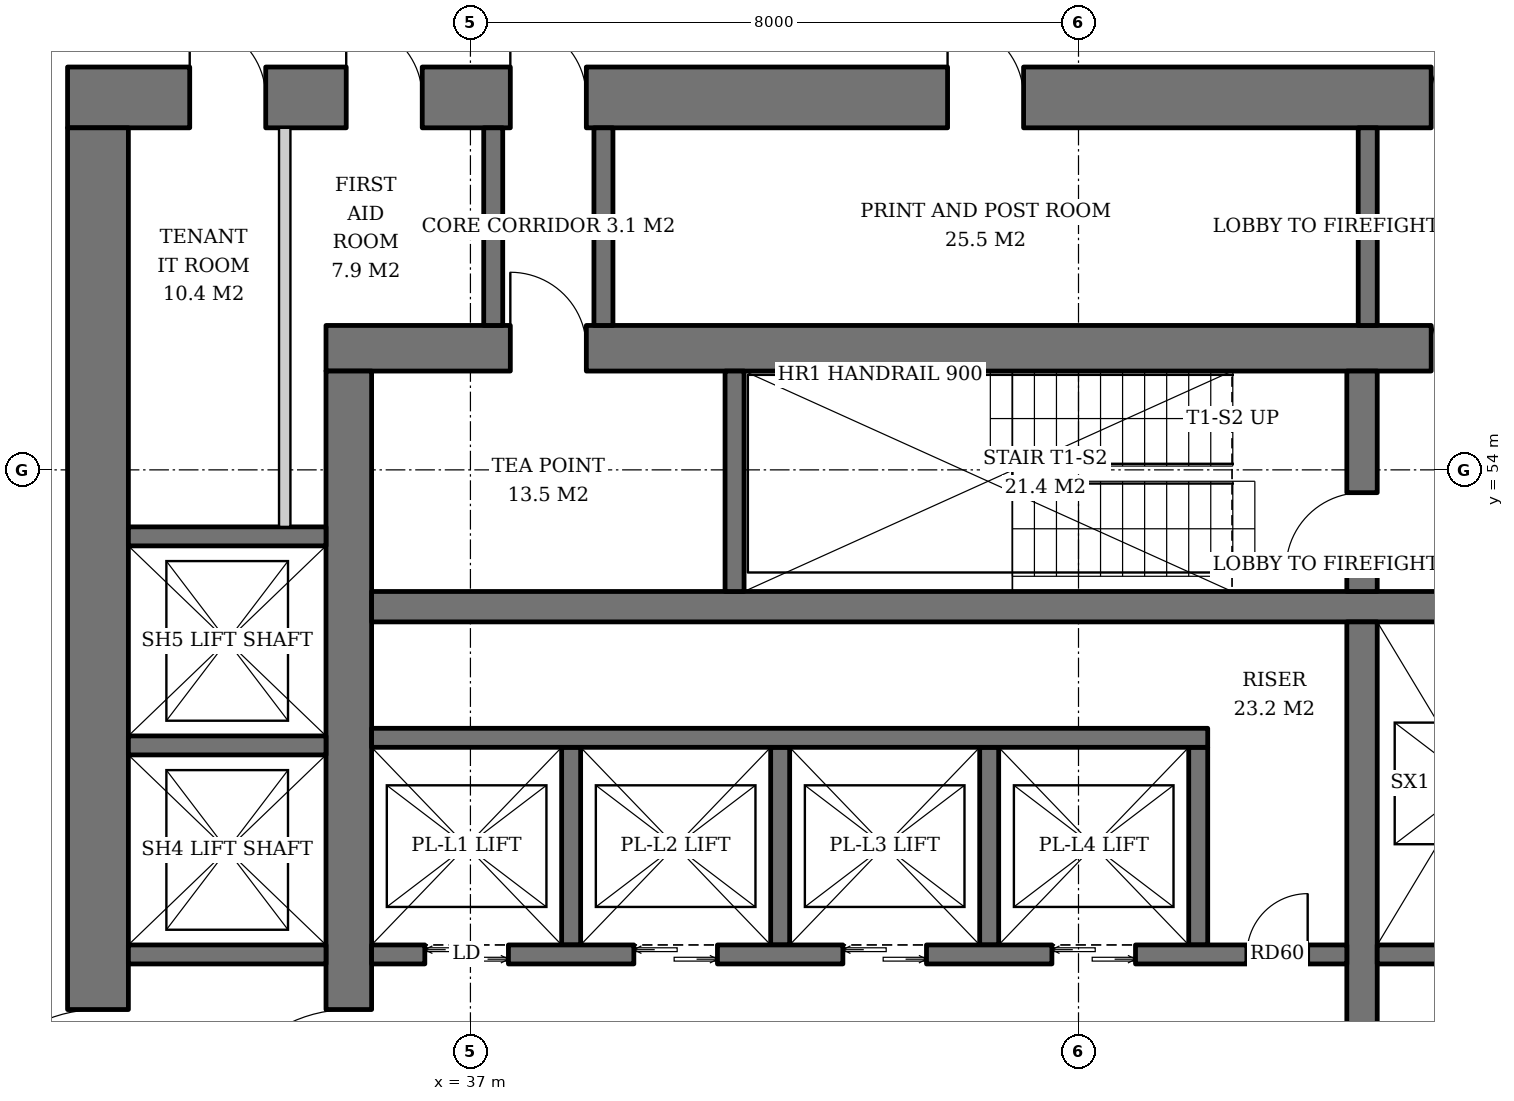
"""IFC4 building model, lengths in metres.
Left out: names, types, materials, properties, quantities, classifications, styles, units other than length and angle.
Written with IfcOpenShell. Run it as: python <this file> out.ifc"""

import sys

from ifc_helpers import new_model, si_unit, direction, frame, frame_2d, origin, place, context, subcontext, project, spatial, rectangle, extrude, element, fill, save


model = new_model("IFC4")
c1 = context("Model", 3, precision=1e-05, world=origin(), true_north=direction((0.0, 1.0)))
c2 = subcontext(c1, "Body", "Model", "MODEL_VIEW")
j1 = project(units=[si_unit("LENGTHUNIT", "METRE"), si_unit("PLANEANGLEUNIT", "RADIAN")], contexts=[c1])
p1 = place(None, origin())
s1 = spatial("IfcSite", under=j1, at=p1, CompositionType="ELEMENT")
p2 = place(p1, origin())
s2 = spatial("IfcBuilding", under=s1, at=p2, CompositionType="ELEMENT")
p3 = place(p2, frame((0.0, 0.0, 36.2)))
s3 = spatial("IfcBuildingStorey", under=s2, at=p3, CompositionType="ELEMENT", Elevation=36.2)
p4 = place(p3, frame((35.1, 55.6, 0.0), z_axis=(0.0, 0.0, 1.0), x_axis=(1.0, 0.0, 0.0)))
e1 = element("IfcWall", 1, at=p4, inside=s3, PredefinedType="SHEAR", context=c2, shape_type="SweptSolid", body=[
    extrude(rectangle(XDim=19.8, YDim=0.6, at=frame_2d((9.9, 0.0))), origin(), (0.0, 0.0, 1.0), 3.8),
])
p5 = place(p4, frame((14.54, 0.0, 0.0)))
e2 = element("IfcOpeningElement", 2, at=p5, cuts=e1, PredefinedType="OPENING", context=c2, shape_type="SweptSolid", body=[
    extrude(rectangle(XDim=1.0, YDim=2.1, at=frame_2d((0.5, 1.05))), frame((0.0, 0.31, 0.0), z_axis=(0.0, -1.0, 0.0), x_axis=(1.0, 0.0, 0.0)), (0.0, 0.0, 1.0), 0.62),
])
p6 = place(p4, frame((2.425, 0.0, 0.0)))
e3 = element("IfcOpeningElement", 3, at=p6, cuts=e1, PredefinedType="OPENING", context=c2, shape_type="SweptSolid", body=[
    extrude(rectangle(XDim=1.0, YDim=2.1, at=frame_2d((0.5, 1.05))), frame((0.0, 0.31, 0.0), z_axis=(0.0, -1.0, 0.0), x_axis=(1.0, 0.0, 0.0)), (0.0, 0.0, 1.0), 0.62),
])
p7 = place(p3, frame((35.4, 36.7, 0.0), z_axis=(0.0, 0.0, 1.0), x_axis=(0.0, 1.0, 0.0)))
e4 = element("IfcWall", 4, at=p7, inside=s3, PredefinedType="SHEAR", context=c2, shape_type="SweptSolid", body=[
    extrude(rectangle(XDim=18.6, YDim=0.6, at=frame_2d((9.3, 0.0))), origin(), (0.0, 0.0, 1.0), 3.8),
])
p8 = place(p7, frame((8.4, 0.0, 0.0)))
e5 = element("IfcOpeningElement", 5, at=p8, cuts=e4, PredefinedType="OPENING", context=c2, shape_type="SweptSolid", body=[
    extrude(rectangle(XDim=1.8, YDim=2.4, at=frame_2d((0.9, 1.2))), frame((0.0, 0.31, 0.0), z_axis=(0.0, -1.0, 0.0), x_axis=(1.0, 0.0, 0.0)), (0.0, 0.0, 1.0), 0.62),
])
p9 = place(p3, frame((31.7, 58.9, 0.0), z_axis=(0.0, 0.0, 1.0), x_axis=(1.0, 0.0, 0.0)))
e6 = element("IfcWall", 6, at=p9, inside=s3, PredefinedType="SHEAR", context=c2, shape_type="SweptSolid", body=[
    extrude(rectangle(XDim=26.6, YDim=0.8, at=frame_2d((13.3, 0.0))), origin(), (0.0, 0.0, 1.0), 3.8),
])
p10 = place(p9, frame((17.94, 0.0, 0.0)))
e7 = element("IfcOpeningElement", 7, at=p10, cuts=e6, PredefinedType="OPENING", context=c2, shape_type="SweptSolid", body=[
    extrude(rectangle(XDim=1.0, YDim=2.1, at=frame_2d((0.5, 1.05))), frame((0.0, 0.41, 0.0), z_axis=(0.0, -1.0, 0.0), x_axis=(1.0, 0.0, 0.0)), (0.0, 0.0, 1.0), 0.82),
])
p11 = place(p9, frame((5.825, 0.0, 0.0)))
e8 = element("IfcOpeningElement", 8, at=p11, cuts=e6, PredefinedType="OPENING", context=c2, shape_type="SweptSolid", body=[
    extrude(rectangle(XDim=1.0, YDim=2.1, at=frame_2d((0.5, 1.05))), frame((0.0, 0.41, 0.0), z_axis=(0.0, -1.0, 0.0), x_axis=(1.0, 0.0, 0.0)), (0.0, 0.0, 1.0), 0.82),
])
p12 = place(p9, frame((1.607, 0.0, 0.0)))
e9 = element("IfcOpeningElement", 9, at=p12, cuts=e6, PredefinedType="OPENING", context=c2, shape_type="SweptSolid", body=[
    extrude(rectangle(XDim=1.0, YDim=2.1, at=frame_2d((0.5, 1.05))), frame((0.0, 0.41, 0.0), z_axis=(0.0, -1.0, 0.0), x_axis=(1.0, 0.0, 0.0)), (0.0, 0.0, 1.0), 0.82),
])
p13 = place(p9, frame((3.666, 0.0, 0.0)))
e10 = element("IfcOpeningElement", 10, at=p13, cuts=e6, PredefinedType="OPENING", context=c2, shape_type="SweptSolid", body=[
    extrude(rectangle(XDim=1.0, YDim=2.1, at=frame_2d((0.5, 1.05))), frame((0.0, 0.41, 0.0), z_axis=(0.0, -1.0, 0.0), x_axis=(1.0, 0.0, 0.0)), (0.0, 0.0, 1.0), 0.82),
])
p14 = place(p9, frame((11.577, 0.0, 0.0)))
e11 = element("IfcOpeningElement", 11, at=p14, cuts=e6, PredefinedType="OPENING", context=c2, shape_type="SweptSolid", body=[
    extrude(rectangle(XDim=1.0, YDim=2.1, at=frame_2d((0.5, 1.05))), frame((0.0, 0.41, 0.0), z_axis=(0.0, -1.0, 0.0), x_axis=(1.0, 0.0, 0.0)), (0.0, 0.0, 1.0), 0.82),
])
p15 = place(p9, frame((20.875, 0.0, 0.0)))
e12 = element("IfcOpeningElement", 12, at=p15, cuts=e6, PredefinedType="OPENING", context=c2, shape_type="SweptSolid", body=[
    extrude(rectangle(XDim=1.0, YDim=2.1, at=frame_2d((0.5, 1.05))), frame((0.0, 0.41, 0.0), z_axis=(0.0, -1.0, 0.0), x_axis=(1.0, 0.0, 0.0)), (0.0, 0.0, 1.0), 0.82),
])
p16 = place(p9, frame((23.7, 0.0, 0.0)))
e13 = element("IfcOpeningElement", 13, at=p16, cuts=e6, PredefinedType="OPENING", context=c2, shape_type="SweptSolid", body=[
    extrude(rectangle(XDim=1.0, YDim=2.1, at=frame_2d((0.5, 1.05))), frame((0.0, 0.41, 0.0), z_axis=(0.0, -1.0, 0.0), x_axis=(1.0, 0.0, 0.0)), (0.0, 0.0, 1.0), 0.82),
])
p17 = place(p3, frame((32.1, 33.5, 0.0), z_axis=(0.0, 0.0, 1.0), x_axis=(0.0, 1.0, 0.0)))
e14 = element("IfcWall", 14, at=p17, inside=s3, PredefinedType="SHEAR", context=c2, shape_type="SweptSolid", body=[
    extrude(rectangle(XDim=25.0, YDim=0.8, at=frame_2d((12.5, 0.0))), origin(), (0.0, 0.0, 1.0), 3.8),
])
p18 = place(p17, frame((11.6, 0.0, 0.0)))
e15 = element("IfcOpeningElement", 15, at=p18, cuts=e14, PredefinedType="OPENING", context=c2, shape_type="SweptSolid", body=[
    extrude(rectangle(XDim=1.8, YDim=2.4, at=frame_2d((0.9, 1.2))), frame((0.0, 0.41, 0.0), z_axis=(0.0, -1.0, 0.0), x_axis=(1.0, 0.0, 0.0)), (0.0, 0.0, 1.0), 0.82),
])
p19 = place(p3, frame((35.7, 52.2, 0.0), z_axis=(0.0, 0.0, 1.0), x_axis=(1.0, 0.0, 0.0)))
e16 = element("IfcWall", 16, at=p19, inside=s3, PredefinedType="SHEAR", context=c2, shape_type="SweptSolid", body=[
    extrude(rectangle(XDim=18.6, YDim=0.4, at=frame_2d((9.3, 0.0))), origin(), (0.0, 0.0, 1.0), 3.8),
])
p20 = place(p3, frame((48.73, 40.0, 0.0), z_axis=(0.0, 0.0, 1.0), x_axis=(0.0, 1.0, 0.0)))
e17 = element("IfcWall", 17, at=p20, inside=s3, PredefinedType="SHEAR", context=c2, shape_type="SweptSolid", body=[
    extrude(rectangle(XDim=12.0, YDim=0.4, at=frame_2d((6.0, 0.0))), origin(), (0.0, 0.0, 1.0), 3.8),
])
p21 = place(p3, frame((48.73, 52.4, 0.0), z_axis=(0.0, 0.0, 1.0), x_axis=(0.0, 1.0, 0.0)))
e18 = element("IfcWall", 18, at=p21, inside=s3, PredefinedType="SHEAR", context=c2, shape_type="SweptSolid", body=[
    extrude(rectangle(XDim=2.9, YDim=0.4, at=frame_2d((1.45, 0.0))), origin(), (0.0, 0.0, 1.0), 3.8),
])
p22 = place(p21, frame((0.3, 0.0, 0.0)))
e19 = element("IfcOpeningElement", 19, at=p22, cuts=e18, PredefinedType="OPENING", context=c2, shape_type="SweptSolid", body=[
    extrude(rectangle(XDim=1.0, YDim=2.1, at=frame_2d((0.5, 1.05))), frame((0.0, 0.21, 0.0), z_axis=(0.0, -1.0, 0.0), x_axis=(1.0, 0.0, 0.0)), (0.0, 0.0, 1.0), 0.42),
])
p23 = place(p3, frame((40.475, 52.4, 0.0), z_axis=(0.0, 0.0, 1.0), x_axis=(0.0, 1.0, 0.0)))
e20 = element("IfcWall", 20, at=p23, inside=s3, PredefinedType="SHEAR", context=c2, shape_type="SweptSolid", body=[
    extrude(rectangle(XDim=2.9, YDim=0.25, at=frame_2d((1.45, 0.0))), origin(), (0.0, 0.0, 1.0), 3.8),
])
for number, where, z_axis, x_axis in (
    (21, (38.325, 47.75, 0.0), (0.0, 0.0, 1.0), (0.0, 1.0, 0.0)),
    (22, (41.075, 47.75, 0.0), (0.0, 0.0, 1.0), (0.0, 1.0, 0.0)),
    (23, (43.825, 47.75, 0.0), (0.0, 0.0, 1.0), (0.0, 1.0, 0.0)),
    (24, (46.575, 47.75, 0.0), (0.0, 0.0, 1.0), (0.0, 1.0, 0.0)),
):
    element("IfcWall", number, at=place(p3, frame(where, z_axis=z_axis, x_axis=x_axis)), inside=s3, PredefinedType="SHEAR", context=c2, shape_type="SweptSolid", body=[
        extrude(rectangle(XDim=2.6, YDim=0.25, at=frame_2d((1.3, 0.0))), origin(), (0.0, 0.0, 1.0), 3.8),
    ])
p24 = place(p3, frame((35.7, 50.475, 0.0), z_axis=(0.0, 0.0, 1.0), x_axis=(1.0, 0.0, 0.0)))
e25 = element("IfcWall", 25, at=p24, inside=s3, PredefinedType="SHEAR", context=c2, shape_type="SweptSolid", body=[
    extrude(rectangle(XDim=11.0, YDim=0.25, at=frame_2d((5.5, 0.0))), origin(), (0.0, 0.0, 1.0), 3.8),
])
p25 = place(p3, frame((35.7, 47.625, 0.0), z_axis=(0.0, 0.0, 1.0), x_axis=(1.0, 0.0, 0.0)))
e26 = element("IfcWall", 26, at=p25, inside=s3, PredefinedType="SHEAR", context=c2, shape_type="SweptSolid", body=[
    extrude(rectangle(XDim=12.83, YDim=0.25, at=frame_2d((6.415, 0.0))), origin(), (0.0, 0.0, 1.0), 3.8),
])
p26 = place(p25, frame((0.7, 0.0, 0.0)))
e27 = element("IfcOpeningElement", 27, at=p26, cuts=e26, PredefinedType="OPENING", context=c2, shape_type="SweptSolid", body=[
    extrude(rectangle(XDim=1.1, YDim=2.2, at=frame_2d((0.55, 1.1))), frame((0.0, 0.135, 0.0), z_axis=(0.0, -1.0, 0.0), x_axis=(1.0, 0.0, 0.0)), (0.0, 0.0, 1.0), 0.27),
])
p27 = place(p25, frame((3.45, 0.0, 0.0)))
e28 = element("IfcOpeningElement", 28, at=p27, cuts=e26, PredefinedType="OPENING", context=c2, shape_type="SweptSolid", body=[
    extrude(rectangle(XDim=1.1, YDim=2.2, at=frame_2d((0.55, 1.1))), frame((0.0, 0.135, 0.0), z_axis=(0.0, -1.0, 0.0), x_axis=(1.0, 0.0, 0.0)), (0.0, 0.0, 1.0), 0.27),
])
p28 = place(p25, frame((6.2, 0.0, 0.0)))
e29 = element("IfcOpeningElement", 29, at=p28, cuts=e26, PredefinedType="OPENING", context=c2, shape_type="SweptSolid", body=[
    extrude(rectangle(XDim=1.1, YDim=2.2, at=frame_2d((0.55, 1.1))), frame((0.0, 0.135, 0.0), z_axis=(0.0, -1.0, 0.0), x_axis=(1.0, 0.0, 0.0)), (0.0, 0.0, 1.0), 0.27),
])
p29 = place(p25, frame((8.95, 0.0, 0.0)))
e30 = element("IfcOpeningElement", 30, at=p29, cuts=e26, PredefinedType="OPENING", context=c2, shape_type="SweptSolid", body=[
    extrude(rectangle(XDim=1.1, YDim=2.2, at=frame_2d((0.55, 1.1))), frame((0.0, 0.135, 0.0), z_axis=(0.0, -1.0, 0.0), x_axis=(1.0, 0.0, 0.0)), (0.0, 0.0, 1.0), 0.27),
])
p30 = place(p25, frame((11.515, 0.0, 0.0)))
e31 = element("IfcOpeningElement", 31, at=p30, cuts=e26, PredefinedType="OPENING", context=c2, shape_type="SweptSolid", body=[
    extrude(rectangle(XDim=0.8, YDim=2.0, at=frame_2d((0.4, 1.0))), frame((0.0, 0.135, 0.0), z_axis=(0.0, -1.0, 0.0), x_axis=(1.0, 0.0, 0.0)), (0.0, 0.0, 1.0), 0.27),
])
p31 = place(p3, frame((48.93, 47.625, 0.0), z_axis=(0.0, 0.0, 1.0), x_axis=(1.0, 0.0, 0.0)))
e32 = element("IfcWall", 32, at=p31, inside=s3, PredefinedType="SHEAR", context=c2, shape_type="SweptSolid", body=[
    extrude(rectangle(XDim=5.37, YDim=0.25, at=frame_2d((2.685, 0.0))), origin(), (0.0, 0.0, 1.0), 3.8),
])
for number, where, z_axis, x_axis in (
    (33, (32.5, 47.625, 0.0), (0.0, 0.0, 1.0), (1.0, 0.0, 0.0)),
    (34, (32.5, 50.375, 0.0), (0.0, 0.0, 1.0), (1.0, 0.0, 0.0)),
    (35, (32.5, 53.125, 0.0), (0.0, 0.0, 1.0), (1.0, 0.0, 0.0)),
):
    element("IfcWall", number, at=place(p3, frame(where, z_axis=z_axis, x_axis=x_axis)), inside=s3, PredefinedType="SHEAR", context=c2, shape_type="SweptSolid", body=[
        extrude(rectangle(XDim=2.6, YDim=0.25, at=frame_2d((1.3, 0.0))), origin(), (0.0, 0.0, 1.0), 3.8),
    ])
for number, where, z_axis, x_axis in (
    (36, (48.805, 55.9, 0.0), (0.0, 0.0, 1.0), (0.0, 1.0, 0.0)),
    (37, (37.3, 55.9, 0.0), (0.0, 0.0, 1.0), (0.0, 1.0, 0.0)),
    (38, (38.75, 55.9, 0.0), (0.0, 0.0, 1.0), (0.0, 1.0, 0.0)),
):
    element("IfcWall", number, at=place(p3, frame(where, z_axis=z_axis, x_axis=x_axis)), inside=s3, PredefinedType="SOLIDWALL", context=c2, shape_type="SweptSolid", body=[
        extrude(rectangle(XDim=2.6, YDim=0.25, at=frame_2d((1.3, 0.0))), origin(), (0.0, 0.0, 1.0), 3.62),
    ])
p32 = place(p3, frame((34.557, 53.25, 0.0), z_axis=(0.0, 0.0, 1.0), x_axis=(0.0, 1.0, 0.0)))
e39 = element("IfcWall", 39, at=p32, inside=s3, PredefinedType="SOLIDWALL", context=c2, shape_type="SweptSolid", body=[
    extrude(rectangle(XDim=5.25, YDim=0.15, at=frame_2d((2.625, 0.0))), origin(), (0.0, 0.0, 1.0), 3.62),
])
p33 = place(p26, origin())
e40 = element("IfcDoor", 40, at=p33, inside=s3, OperationType="DOUBLE_DOOR_SLIDING", PredefinedType="DOOR", context=c2, shape_type="SweptSolid", body=[
    extrude(rectangle(XDim=1.1, YDim=2.2, at=frame_2d((0.55, 1.1))), frame((0.0, 0.025, 0.0), z_axis=(0.0, -1.0, 0.0), x_axis=(1.0, 0.0, 0.0)), (0.0, 0.0, 1.0), 0.05),
])
fill(e27, e40)
p34 = place(p27, origin())
e41 = element("IfcDoor", 41, at=p34, inside=s3, OperationType="DOUBLE_DOOR_SLIDING", PredefinedType="DOOR", context=c2, shape_type="SweptSolid", body=[
    extrude(rectangle(XDim=1.1, YDim=2.2, at=frame_2d((0.55, 1.1))), frame((0.0, 0.025, 0.0), z_axis=(0.0, -1.0, 0.0), x_axis=(1.0, 0.0, 0.0)), (0.0, 0.0, 1.0), 0.05),
])
fill(e28, e41)
p35 = place(p28, origin())
e42 = element("IfcDoor", 42, at=p35, inside=s3, OperationType="DOUBLE_DOOR_SLIDING", PredefinedType="DOOR", context=c2, shape_type="SweptSolid", body=[
    extrude(rectangle(XDim=1.1, YDim=2.2, at=frame_2d((0.55, 1.1))), frame((0.0, 0.025, 0.0), z_axis=(0.0, -1.0, 0.0), x_axis=(1.0, 0.0, 0.0)), (0.0, 0.0, 1.0), 0.05),
])
fill(e29, e42)
p36 = place(p29, origin())
e43 = element("IfcDoor", 43, at=p36, inside=s3, OperationType="DOUBLE_DOOR_SLIDING", PredefinedType="DOOR", context=c2, shape_type="SweptSolid", body=[
    extrude(rectangle(XDim=1.1, YDim=2.2, at=frame_2d((0.55, 1.1))), frame((0.0, 0.025, 0.0), z_axis=(0.0, -1.0, 0.0), x_axis=(1.0, 0.0, 0.0)), (0.0, 0.0, 1.0), 0.05),
])
fill(e30, e43)
p37 = place(p30, origin())
e44 = element("IfcDoor", 44, at=p37, inside=s3, OperationType="SINGLE_SWING_RIGHT", PredefinedType="DOOR", context=c2, shape_type="SweptSolid", body=[
    extrude(rectangle(XDim=0.8, YDim=2.0, at=frame_2d((0.4, 1.0))), frame((0.0, 0.025, 0.0), z_axis=(0.0, -1.0, 0.0), x_axis=(1.0, 0.0, 0.0)), (0.0, 0.0, 1.0), 0.05),
])
fill(e31, e44)
p38 = place(p22, origin())
e45 = element("IfcDoor", 45, at=p38, inside=s3, OperationType="SINGLE_SWING_LEFT", PredefinedType="DOOR", context=c2, shape_type="SweptSolid", body=[
    extrude(rectangle(XDim=1.0, YDim=2.1, at=frame_2d((0.5, 1.05))), frame((0.0, 0.025, 0.0), z_axis=(0.0, -1.0, 0.0), x_axis=(1.0, 0.0, 0.0)), (0.0, 0.0, 1.0), 0.05),
])
fill(e19, e45)
p39 = place(p5, origin())
e46 = element("IfcDoor", 46, at=p39, inside=s3, OperationType="SINGLE_SWING_RIGHT", PredefinedType="DOOR", context=c2, shape_type="SweptSolid", body=[
    extrude(rectangle(XDim=1.0, YDim=2.1, at=frame_2d((0.5, 1.05))), frame((0.0, 0.025, 0.0), z_axis=(0.0, -1.0, 0.0), x_axis=(1.0, 0.0, 0.0)), (0.0, 0.0, 1.0), 0.05),
])
fill(e2, e46)
p40 = place(p8, origin())
e47 = element("IfcDoor", 47, at=p40, inside=s3, OperationType="DOUBLE_DOOR_SINGLE_SWING", PredefinedType="DOOR", context=c2, shape_type="SweptSolid", body=[
    extrude(rectangle(XDim=1.8, YDim=2.4, at=frame_2d((0.9, 1.2))), frame((0.0, 0.025, 0.0), z_axis=(0.0, -1.0, 0.0), x_axis=(1.0, 0.0, 0.0)), (0.0, 0.0, 1.0), 0.05),
])
fill(e5, e47)
p41 = place(p18, origin())
e48 = element("IfcDoor", 48, at=p41, inside=s3, OperationType="DOUBLE_DOOR_SINGLE_SWING", PredefinedType="DOOR", context=c2, shape_type="SweptSolid", body=[
    extrude(rectangle(XDim=1.8, YDim=2.4, at=frame_2d((0.9, 1.2))), frame((0.0, 0.025, 0.0), z_axis=(0.0, -1.0, 0.0), x_axis=(1.0, 0.0, 0.0)), (0.0, 0.0, 1.0), 0.05),
])
fill(e15, e48)
p42 = place(p10, origin())
e49 = element("IfcDoor", 49, at=p42, inside=s3, OperationType="SINGLE_SWING_RIGHT", PredefinedType="DOOR", context=c2, shape_type="SweptSolid", body=[
    extrude(rectangle(XDim=1.0, YDim=2.1, at=frame_2d((0.5, 1.05))), frame((0.0, 0.025, 0.0), z_axis=(0.0, -1.0, 0.0), x_axis=(1.0, 0.0, 0.0)), (0.0, 0.0, 1.0), 0.05),
])
fill(e7, e49)
p43 = place(p11, origin())
e50 = element("IfcDoor", 50, at=p43, inside=s3, OperationType="SINGLE_SWING_LEFT", PredefinedType="DOOR", context=c2, shape_type="SweptSolid", body=[
    extrude(rectangle(XDim=1.0, YDim=2.1, at=frame_2d((0.5, 1.05))), frame((0.0, 0.025, 0.0), z_axis=(0.0, -1.0, 0.0), x_axis=(1.0, 0.0, 0.0)), (0.0, 0.0, 1.0), 0.05),
])
fill(e8, e50)
p44 = place(p6, origin())
e51 = element("IfcDoor", 51, at=p44, inside=s3, OperationType="SINGLE_SWING_LEFT", PredefinedType="DOOR", context=c2, shape_type="SweptSolid", body=[
    extrude(rectangle(XDim=1.0, YDim=2.1, at=frame_2d((0.5, 1.05))), frame((0.0, -0.24, 0.0), z_axis=(0.0, -1.0, 0.0), x_axis=(1.0, 0.0, 0.0)), (0.0, 0.0, 1.0), 0.05),
])
fill(e3, e51)
p45 = place(p12, origin())
e52 = element("IfcDoor", 52, at=p45, inside=s3, OperationType="SINGLE_SWING_LEFT", PredefinedType="DOOR", context=c2, shape_type="SweptSolid", body=[
    extrude(rectangle(XDim=1.0, YDim=2.1, at=frame_2d((0.5, 1.05))), frame((0.0, -0.34, 0.0), z_axis=(0.0, -1.0, 0.0), x_axis=(1.0, 0.0, 0.0)), (0.0, 0.0, 1.0), 0.05),
])
fill(e9, e52)
p46 = place(p13, origin())
e53 = element("IfcDoor", 53, at=p46, inside=s3, OperationType="SINGLE_SWING_LEFT", PredefinedType="DOOR", context=c2, shape_type="SweptSolid", body=[
    extrude(rectangle(XDim=1.0, YDim=2.1, at=frame_2d((0.5, 1.05))), frame((0.0, -0.34, 0.0), z_axis=(0.0, -1.0, 0.0), x_axis=(1.0, 0.0, 0.0)), (0.0, 0.0, 1.0), 0.05),
])
fill(e10, e53)
p47 = place(p14, origin())
e54 = element("IfcDoor", 54, at=p47, inside=s3, OperationType="SINGLE_SWING_LEFT", PredefinedType="DOOR", context=c2, shape_type="SweptSolid", body=[
    extrude(rectangle(XDim=1.0, YDim=2.1, at=frame_2d((0.5, 1.05))), frame((0.0, -0.34, 0.0), z_axis=(0.0, -1.0, 0.0), x_axis=(1.0, 0.0, 0.0)), (0.0, 0.0, 1.0), 0.05),
])
fill(e11, e54)
save(model, sys.argv[1])
